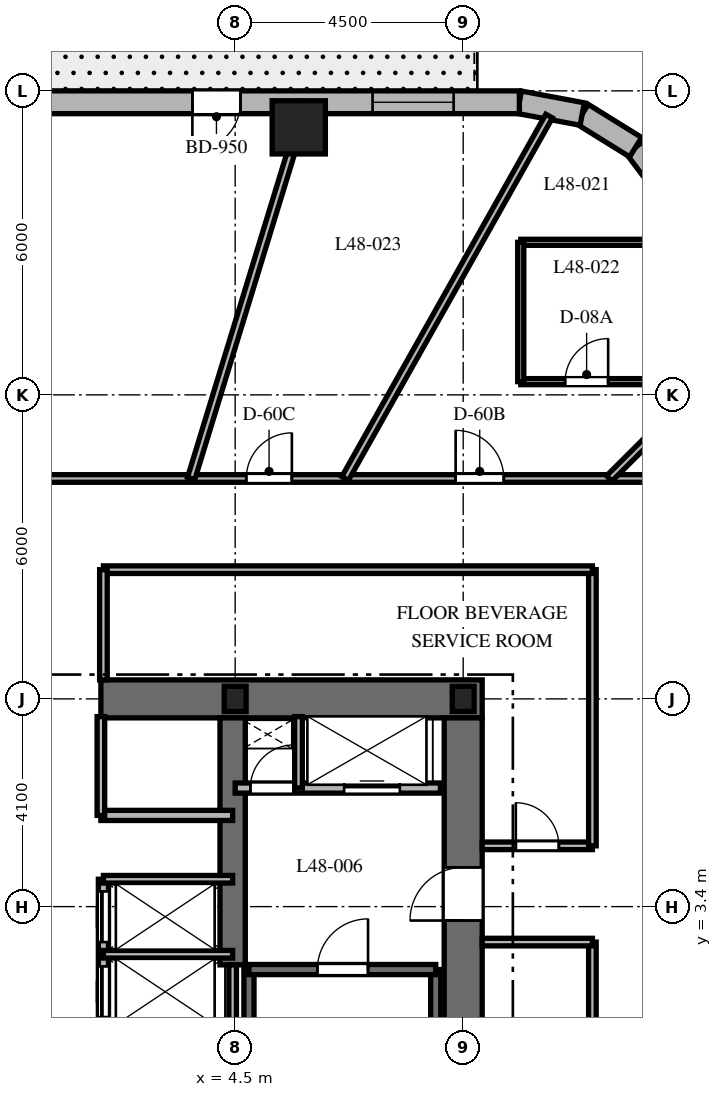
"""IFC4 building model, lengths in metres.
Left out: names, types, materials, properties, quantities, classifications, styles, units other than length and angle.
Written with IfcOpenShell. Run it as: python <this file> out.ifc"""

import sys

from ifc_helpers import new_model, si_unit, direction, frame, frame_2d, origin, origin_2d, place, context, subcontext, project, spatial, rectangle, i_section, extrude, element, fill, save


model = new_model("IFC4")
c1 = context("Model", 3, precision=1e-05, world=origin(), true_north=direction((0.0, 1.0)))
c2 = subcontext(c1, "Body", "Model", "MODEL_VIEW")
j1 = project(units=[si_unit("LENGTHUNIT", "METRE"), si_unit("PLANEANGLEUNIT", "RADIAN")], contexts=[c1])
p1 = place(None, origin())
s1 = spatial("IfcSite", under=j1, at=p1, CompositionType="ELEMENT")
p2 = place(p1, origin())
s2 = spatial("IfcBuilding", under=s1, at=p2, CompositionType="ELEMENT")
p3 = place(p2, frame((0.0, 0.0, 194.1)))
s3 = spatial("IfcBuildingStorey", under=s2, at=p3, CompositionType="ELEMENT", Elevation=194.1)
p4 = place(p3, frame((1.85, 7.5, 0.0), z_axis=(0.0, 0.0, 1.0), x_axis=(1.0, 0.0, 0.0)))
e1 = element("IfcWall", 1, at=p4, inside=s3, PredefinedType="SHEAR", context=c2, shape_type="SweptSolid", body=[
    extrude(rectangle(XDim=7.525, YDim=0.75, at=frame_2d((3.762, 0.0))), origin(), (0.0, 0.0, 1.0), 3.7),
])
p5 = place(p3, frame((9.0, -7.125, 0.0), z_axis=(0.0, 0.0, 1.0), x_axis=(0.0, 1.0, 0.0)))
e2 = element("IfcWall", 2, at=p5, inside=s3, PredefinedType="SHEAR", context=c2, shape_type="SweptSolid", body=[
    extrude(rectangle(XDim=14.25, YDim=0.75, at=frame_2d((7.125, 0.0))), origin(), (0.0, 0.0, 1.0), 3.7),
])
p6 = place(p5, frame((10.25, 0.0, 0.0)))
e3 = element("IfcOpeningElement", 3, at=p6, cuts=e2, PredefinedType="OPENING", context=c2, shape_type="SweptSolid", body=[
    extrude(rectangle(XDim=1.05, YDim=2.15, at=frame_2d((0.525, 1.075))), frame((0.0, 0.385, 0.0), z_axis=(0.0, -1.0, 0.0), x_axis=(1.0, 0.0, 0.0)), (0.0, 0.0, 1.0), 0.77),
])
p7 = place(p3, frame((4.45, 2.25, 0.0), z_axis=(0.0, 0.0, 1.0), x_axis=(0.0, 1.0, 0.0)))
e4 = element("IfcWall", 4, at=p7, inside=s3, PredefinedType="SHEAR", context=c2, shape_type="SweptSolid", body=[
    extrude(rectangle(XDim=4.875, YDim=0.5, at=frame_2d((2.438, 0.0))), origin(), (0.0, 0.0, 1.0), 3.7),
])
for number, where, z_axis, x_axis in (
    (5, (4.772, -6.985, 0.0), (0.0, 0.0, 1.0), (0.0, 1.0, 0.0)),
    (6, (8.458, -6.985, 0.0), (0.0, 0.0, 1.0), (0.0, 1.0, 0.0)),
):
    element("IfcWall", number, at=place(p3, frame(where, z_axis=z_axis, x_axis=x_axis)), inside=s3, PredefinedType="SHEAR", context=c2, shape_type="SweptSolid", body=[
        extrude(rectangle(XDim=9.143, YDim=0.2, at=frame_2d((4.572, 0.0))), origin(), (0.0, 0.0, 1.0), 3.7),
    ])
p8 = place(p3, frame((4.772, 2.158, 0.0), z_axis=(0.0, 0.0, 1.0), x_axis=(1.0, 0.0, 0.0)))
e7 = element("IfcWall", 7, at=p8, inside=s3, PredefinedType="SHEAR", context=c2, shape_type="SweptSolid", body=[
    extrude(rectangle(XDim=3.686, YDim=0.2, at=frame_2d((1.843, 0.0))), origin(), (0.0, 0.0, 1.0), 3.7),
])
p9 = place(p8, frame((1.35, 0.0, 0.0)))
e8 = element("IfcOpeningElement", 8, at=p9, cuts=e7, PredefinedType="OPENING", context=c2, shape_type="SweptSolid", body=[
    extrude(rectangle(XDim=1.0, YDim=2.15, at=frame_2d((0.5, 1.075))), frame((0.0, 0.11, 0.0), z_axis=(0.0, -1.0, 0.0), x_axis=(1.0, 0.0, 0.0)), (0.0, 0.0, 1.0), 0.22),
])
for number, where, z_axis, x_axis in (
    (9, (9.0, 7.5, 0.0), (0.0, 0.0, 1.0), (1.0, 0.0, 0.0)),
    (10, (4.5, 7.5, 0.0), (0.0, 0.0, 1.0), (1.0, 0.0, 0.0)),
):
    element("IfcColumn", number, at=place(p3, frame(where, z_axis=z_axis, x_axis=x_axis)), inside=s3, PredefinedType="COLUMN", context=c2, shape_type="SweptSolid", body=[
        extrude(i_section(OverallWidth=0.432, OverallDepth=0.498, WebThickness=0.056, FlangeThickness=0.089, at=origin_2d()), origin(), (0.0, 0.0, 1.0), 3.7),
    ])
p10 = place(p3, frame((5.755, 18.78, 0.0), z_axis=(0.0, 0.0, 1.0), x_axis=(1.0, 0.0, 0.0)))
e11 = element("IfcColumn", 11, at=p10, inside=s3, PredefinedType="COLUMN", context=c2, shape_type="SweptSolid", body=[
    extrude(rectangle(XDim=1.05, YDim=1.05, at=origin_2d()), origin(), (0.0, 0.0, 1.0), 3.7),
])
p11 = place(p3, frame((13.162, 17.381, 0.0), z_axis=(0.0, 0.0, 1.0), x_axis=(-0.601515770517, 0.798860925205, 0.0)))
e12 = element("IfcWall", 12, at=p11, inside=s3, PredefinedType="SOLIDWALL", context=c2, shape_type="SweptSolid", body=[
    extrude(rectangle(XDim=1.262, YDim=0.45, at=frame_2d((0.631, 0.0))), origin(), (0.0, 0.0, 1.0), 3.4),
])
p12 = place(p3, frame((12.403, 18.389, 0.0), z_axis=(0.0, 0.0, 1.0), x_axis=(-0.849795170926, 0.527113049991, 0.0)))
e13 = element("IfcWall", 13, at=p12, inside=s3, PredefinedType="SOLIDWALL", context=c2, shape_type="SweptSolid", body=[
    extrude(rectangle(XDim=1.241, YDim=0.45, at=frame_2d((0.62, 0.0))), origin(), (0.0, 0.0, 1.0), 3.4),
])
p13 = place(p3, frame((11.349, 19.043, 0.0), z_axis=(0.0, 0.0, 1.0), x_axis=(-0.982931267051, 0.183973161772, 0.0)))
e14 = element("IfcWall", 14, at=p13, inside=s3, PredefinedType="SOLIDWALL", context=c2, shape_type="SweptSolid", body=[
    extrude(rectangle(XDim=1.262, YDim=0.45, at=frame_2d((0.631, 0.0))), origin(), (0.0, 0.0, 1.0), 3.4),
])
p14 = place(p3, frame((10.108, 19.275, 0.0), z_axis=(0.0, 0.0, 1.0), x_axis=(-1.0, 0.0, 0.0)))
e15 = element("IfcWall", 15, at=p14, inside=s3, PredefinedType="SOLIDWALL", context=c2, shape_type="SweptSolid", body=[
    extrude(rectangle(XDim=21.829, YDim=0.45, at=frame_2d((10.915, 0.0))), origin(), (0.0, 0.0, 1.0), 3.4),
])
p15 = place(p14, frame((5.503, 0.0, 0.0)))
e16 = element("IfcOpeningElement", 16, at=p15, cuts=e15, PredefinedType="OPENING", context=c2, shape_type="SweptSolid", body=[
    extrude(rectangle(XDim=0.95, YDim=2.15, at=frame_2d((0.475, 1.075))), frame((0.0, 0.235, 0.0), z_axis=(0.0, -1.0, 0.0), x_axis=(1.0, 0.0, 0.0)), (0.0, 0.0, 1.0), 0.47),
])
p16 = place(p14, frame((1.297, 0.0, 0.8)))
e17 = element("IfcOpeningElement", 17, at=p16, cuts=e15, PredefinedType="OPENING", context=c2, shape_type="SweptSolid", body=[
    extrude(rectangle(XDim=1.6, YDim=1.75, at=frame_2d((0.8, 0.875))), frame((0.0, 0.235, 0.0), z_axis=(0.0, -1.0, 0.0), x_axis=(1.0, 0.0, 0.0)), (0.0, 0.0, 1.0), 0.47),
])
p17 = place(p14, frame((10.115, 0.0, 0.8)))
e18 = element("IfcOpeningElement", 18, at=p17, cuts=e15, PredefinedType="OPENING", context=c2, shape_type="SweptSolid", body=[
    extrude(rectangle(XDim=1.6, YDim=1.75, at=frame_2d((0.8, 0.875))), frame((0.0, 0.235, 0.0), z_axis=(0.0, -1.0, 0.0), x_axis=(1.0, 0.0, 0.0)), (0.0, 0.0, 1.0), 0.47),
])
p18 = place(p14, frame((18.933, 0.0, 0.8)))
e19 = element("IfcOpeningElement", 19, at=p18, cuts=e15, PredefinedType="OPENING", context=c2, shape_type="SweptSolid", body=[
    extrude(rectangle(XDim=1.6, YDim=1.75, at=frame_2d((0.8, 0.875))), frame((0.0, 0.235, 0.0), z_axis=(0.0, -1.0, 0.0), x_axis=(1.0, 0.0, 0.0)), (0.0, 0.0, 1.0), 0.47),
])
p19 = place(p3, frame((4.5, 5.74, 0.0), z_axis=(0.0, 0.0, 1.0), x_axis=(1.0, 0.0, 0.0)))
e20 = element("IfcWall", 20, at=p19, inside=s3, PredefinedType="PARTITIONING", context=c2, shape_type="SweptSolid", body=[
    extrude(rectangle(XDim=4.05, YDim=0.2, at=frame_2d((2.025, 0.0))), origin(), (0.0, 0.0, 1.0), 3.4),
])
p20 = place(p19, frame((0.3, 0.0, 0.0)))
e21 = element("IfcOpeningElement", 21, at=p20, cuts=e20, PredefinedType="OPENING", context=c2, shape_type="SweptSolid", body=[
    extrude(rectangle(XDim=0.85, YDim=2.03, at=frame_2d((0.425, 1.015))), frame((0.0, 0.11, 0.0), z_axis=(0.0, -1.0, 0.0), x_axis=(1.0, 0.0, 0.0)), (0.0, 0.0, 1.0), 0.22),
])
p21 = place(p19, frame((2.15, 0.0, 0.0)))
e22 = element("IfcOpeningElement", 22, at=p21, cuts=e20, PredefinedType="OPENING", context=c2, shape_type="SweptSolid", body=[
    extrude(rectangle(XDim=1.1, YDim=2.2, at=frame_2d((0.55, 1.1))), frame((0.0, 0.11, 0.0), z_axis=(0.0, -1.0, 0.0), x_axis=(1.0, 0.0, 0.0)), (0.0, 0.0, 1.0), 0.22),
])
p22 = place(p3, frame((5.75, 5.74, 0.0), z_axis=(0.0, 0.0, 1.0), x_axis=(0.0, 1.0, 0.0)))
e23 = element("IfcWall", 23, at=p22, inside=s3, PredefinedType="PARTITIONING", context=c2, shape_type="SweptSolid", body=[
    extrude(rectangle(XDim=1.41, YDim=0.15, at=frame_2d((0.705, 0.0))), origin(), (0.0, 0.0, 1.0), 3.4),
])
p23 = place(p3, frame((1.85, 5.2, 0.0), z_axis=(0.0, 0.0, 1.0), x_axis=(1.0, 0.0, 0.0)))
e24 = element("IfcWall", 24, at=p23, inside=s3, PredefinedType="PARTITIONING", context=c2, shape_type="SweptSolid", body=[
    extrude(rectangle(XDim=2.6, YDim=0.2, at=frame_2d((1.3, 0.0))), origin(), (0.0, 0.0, 1.0), 3.4),
])
p24 = place(p3, frame((1.85, 5.2, 0.0), z_axis=(0.0, 0.0, 1.0), x_axis=(0.0, 1.0, 0.0)))
e25 = element("IfcWall", 25, at=p24, inside=s3, PredefinedType="PARTITIONING", context=c2, shape_type="SweptSolid", body=[
    extrude(rectangle(XDim=1.95, YDim=0.15, at=frame_2d((0.975, 0.0))), origin(), (0.0, 0.0, 1.0), 3.4),
])
p25 = place(p3, frame((4.45, -1.972, 0.0), z_axis=(0.0, 0.0, 1.0), x_axis=(0.0, 1.0, 0.0)))
e26 = element("IfcWall", 26, at=p25, inside=s3, PredefinedType="PARTITIONING", context=c2, shape_type="SweptSolid", body=[
    extrude(rectangle(XDim=4.222, YDim=0.15, at=frame_2d((2.111, 0.0))), origin(), (0.0, 0.0, 1.0), 3.4),
])
p26 = place(p3, frame((1.9, -0.5, 0.0), z_axis=(0.0, 0.0, 1.0), x_axis=(0.0, 1.0, 0.0)))
e27 = element("IfcWall", 27, at=p26, inside=s3, PredefinedType="PARTITIONING", context=c2, shape_type="SweptSolid", body=[
    extrude(rectangle(XDim=4.44, YDim=0.2, at=frame_2d((2.22, 0.0))), origin(), (0.0, 0.0, 1.0), 3.4),
])
p27 = place(p26, frame((0.24, 0.0, 0.0)))
e28 = element("IfcOpeningElement", 28, at=p27, cuts=e27, PredefinedType="OPENING", context=c2, shape_type="SweptSolid", body=[
    extrude(rectangle(XDim=1.0, YDim=2.2, at=frame_2d((0.5, 1.1))), frame((0.0, 0.11, 0.0), z_axis=(0.0, -1.0, 0.0), x_axis=(1.0, 0.0, 0.0)), (0.0, 0.0, 1.0), 0.22),
])
p28 = place(p26, frame((1.72, 0.0, 0.0)))
e29 = element("IfcOpeningElement", 29, at=p28, cuts=e27, PredefinedType="OPENING", context=c2, shape_type="SweptSolid", body=[
    extrude(rectangle(XDim=1.0, YDim=2.2, at=frame_2d((0.5, 1.1))), frame((0.0, 0.11, 0.0), z_axis=(0.0, -1.0, 0.0), x_axis=(1.0, 0.0, 0.0)), (0.0, 0.0, 1.0), 0.22),
])
p29 = place(p26, frame((3.2, 0.0, 0.0)))
e30 = element("IfcOpeningElement", 30, at=p29, cuts=e27, PredefinedType="OPENING", context=c2, shape_type="SweptSolid", body=[
    extrude(rectangle(XDim=1.0, YDim=2.2, at=frame_2d((0.5, 1.1))), frame((0.0, 0.11, 0.0), z_axis=(0.0, -1.0, 0.0), x_axis=(1.0, 0.0, 0.0)), (0.0, 0.0, 1.0), 0.22),
])
for number, where, z_axis, x_axis in (
    (31, (1.9, 3.94, 0.0), (0.0, 0.0, 1.0), (1.0, 0.0, 0.0)),
    (32, (1.9, 2.46, 0.0), (0.0, 0.0, 1.0), (1.0, 0.0, 0.0)),
):
    element("IfcWall", number, at=place(p3, frame(where, z_axis=z_axis, x_axis=x_axis)), inside=s3, PredefinedType="PARTITIONING", context=c2, shape_type="SweptSolid", body=[
        extrude(rectangle(XDim=2.55, YDim=0.15, at=frame_2d((1.275, 0.0))), origin(), (0.0, 0.0, 1.0), 3.4),
    ])
p30 = place(p3, frame((-13.35, 11.85, 0.0), z_axis=(0.0, 0.0, 1.0), x_axis=(1.0, 0.0, 0.0)))
e33 = element("IfcWall", 33, at=p30, inside=s3, PredefinedType="PARTITIONING", context=c2, shape_type="SweptSolid", body=[
    extrude(rectangle(XDim=26.7, YDim=0.15, at=frame_2d((13.35, 0.0))), origin(), (0.0, 0.0, 1.0), 2.84),
])
p31 = place(p30, frame((22.201, 0.0, 0.0)))
e34 = element("IfcOpeningElement", 34, at=p31, cuts=e33, PredefinedType="OPENING", context=c2, shape_type="SweptSolid", body=[
    extrude(rectangle(XDim=0.95, YDim=2.03, at=frame_2d((0.475, 1.015))), frame((0.0, 0.085, 0.0), z_axis=(0.0, -1.0, 0.0), x_axis=(1.0, 0.0, 0.0)), (0.0, 0.0, 1.0), 0.17),
])
p32 = place(p30, frame((18.069, 0.0, 0.0)))
e35 = element("IfcOpeningElement", 35, at=p32, cuts=e33, PredefinedType="OPENING", context=c2, shape_type="SweptSolid", body=[
    extrude(rectangle(XDim=0.9, YDim=2.03, at=frame_2d((0.45, 1.015))), frame((0.0, 0.085, 0.0), z_axis=(0.0, -1.0, 0.0), x_axis=(1.0, 0.0, 0.0)), (0.0, 0.0, 1.0), 0.17),
])
p33 = place(p30, frame((12.362, 0.0, 0.0)))
e36 = element("IfcOpeningElement", 36, at=p33, cuts=e33, PredefinedType="OPENING", context=c2, shape_type="SweptSolid", body=[
    extrude(rectangle(XDim=0.95, YDim=2.03, at=frame_2d((0.475, 1.015))), frame((0.0, 0.085, 0.0), z_axis=(0.0, -1.0, 0.0), x_axis=(1.0, 0.0, 0.0)), (0.0, 0.0, 1.0), 0.17),
])
p34 = place(p30, frame((3.995, 0.0, 0.0)))
e37 = element("IfcOpeningElement", 37, at=p34, cuts=e33, PredefinedType="OPENING", context=c2, shape_type="SweptSolid", body=[
    extrude(rectangle(XDim=0.95, YDim=2.03, at=frame_2d((0.475, 1.015))), frame((0.0, 0.085, 0.0), z_axis=(0.0, -1.0, 0.0), x_axis=(1.0, 0.0, 0.0)), (0.0, 0.0, 1.0), 0.17),
])
p35 = place(p3, frame((11.55, -10.05, 0.0), z_axis=(0.0, 0.0, 1.0), x_axis=(0.0, 1.0, 0.0)))
e38 = element("IfcWall", 38, at=p35, inside=s3, PredefinedType="PARTITIONING", context=c2, shape_type="SweptSolid", body=[
    extrude(rectangle(XDim=12.75, YDim=0.15, at=frame_2d((6.375, 0.0))), origin(), (0.0, 0.0, 1.0), 2.84),
])
p36 = place(p35, frame((5.95, 0.0, 0.0)))
e39 = element("IfcOpeningElement", 39, at=p36, cuts=e38, PredefinedType="OPENING", context=c2, shape_type="SweptSolid", body=[
    extrude(rectangle(XDim=0.85, YDim=2.03, at=frame_2d((0.425, 1.015))), frame((0.0, 0.085, 0.0), z_axis=(0.0, -1.0, 0.0), x_axis=(1.0, 0.0, 0.0)), (0.0, 0.0, 1.0), 0.17),
])
p37 = place(p3, frame((11.55, 2.7, 0.0), z_axis=(0.0, 0.0, 1.0), x_axis=(-1.0, 0.0, 0.0)))
e40 = element("IfcWall", 40, at=p37, inside=s3, PredefinedType="PARTITIONING", context=c2, shape_type="SweptSolid", body=[
    extrude(rectangle(XDim=2.175, YDim=0.15, at=frame_2d((1.087, 0.0))), origin(), (0.0, 0.0, 1.0), 3.4),
])
p38 = place(p3, frame((9.375, 4.6, 0.0), z_axis=(0.0, 0.0, 1.0), x_axis=(1.0, 0.0, 0.0)))
e41 = element("IfcWall", 41, at=p38, inside=s3, PredefinedType="PARTITIONING", context=c2, shape_type="SweptSolid", body=[
    extrude(rectangle(XDim=2.175, YDim=0.15, at=frame_2d((1.087, 0.0))), origin(), (0.0, 0.0, 1.0), 3.4),
])
p39 = place(p38, frame((0.663, 0.0, 0.0)))
e42 = element("IfcOpeningElement", 42, at=p39, cuts=e41, PredefinedType="OPENING", context=c2, shape_type="SweptSolid", body=[
    extrude(rectangle(XDim=0.85, YDim=2.03, at=frame_2d((0.425, 1.015))), frame((0.0, 0.085, 0.0), z_axis=(0.0, -1.0, 0.0), x_axis=(1.0, 0.0, 0.0)), (0.0, 0.0, 1.0), 0.17),
])
p40 = place(p3, frame((11.55, 4.6, 0.0), z_axis=(0.0, 0.0, 1.0), x_axis=(0.0, 1.0, 0.0)))
e43 = element("IfcWall", 43, at=p40, inside=s3, PredefinedType="PARTITIONING", context=c2, shape_type="SweptSolid", body=[
    extrude(rectangle(XDim=5.45, YDim=0.15, at=frame_2d((2.725, 0.0))), origin(), (0.0, 0.0, 1.0), 2.84),
])
p41 = place(p3, frame((11.55, 10.05, 0.0), z_axis=(0.0, 0.0, 1.0), x_axis=(-1.0, 0.0, 0.0)))
e44 = element("IfcWall", 44, at=p41, inside=s3, PredefinedType="PARTITIONING", context=c2, shape_type="SweptSolid", body=[
    extrude(rectangle(XDim=9.65, YDim=0.15, at=frame_2d((4.825, 0.0))), origin(), (0.0, 0.0, 1.0), 2.84),
])
p42 = place(p3, frame((1.9, 10.05, 0.0), z_axis=(0.0, 0.0, 1.0), x_axis=(0.0, -1.0, 0.0)))
e45 = element("IfcWall", 45, at=p42, inside=s3, PredefinedType="PARTITIONING", context=c2, shape_type="SweptSolid", body=[
    extrude(rectangle(XDim=2.175, YDim=0.15, at=frame_2d((1.087, 0.0))), origin(), (0.0, 0.0, 1.0), 3.4),
])
p43 = place(p3, frame((11.882, 11.85, 0.0), z_axis=(0.0, 0.0, 1.0), x_axis=(0.708037373639, 0.706174962407, 0.0)))
e46 = element("IfcWall", 46, at=p43, inside=s3, PredefinedType="PARTITIONING", context=c2, shape_type="SweptSolid", body=[
    extrude(rectangle(XDim=3.802, YDim=0.15, at=frame_2d((1.901, 0.0))), origin(), (0.0, 0.0, 1.0), 2.64),
])
p44 = place(p3, frame((6.67, 11.85, 0.0), z_axis=(0.0, 0.0, 1.0), x_axis=(0.490522493943, 0.871428530022, 0.0)))
e47 = element("IfcWall", 47, at=p44, inside=s3, PredefinedType="PARTITIONING", context=c2, shape_type="SweptSolid", body=[
    extrude(rectangle(XDim=8.207, YDim=0.15, at=frame_2d((4.104, 0.0))), origin(), (0.0, 0.0, 1.0), 2.64),
])
p45 = place(p3, frame((3.631, 11.85, 0.0), z_axis=(0.0, 0.0, 1.0), x_axis=(0.293007573338, 0.956110120209, 0.0)))
e48 = element("IfcWall", 48, at=p45, inside=s3, PredefinedType="PARTITIONING", context=c2, shape_type="SweptSolid", body=[
    extrude(rectangle(XDim=7.766, YDim=0.15, at=frame_2d((3.883, 0.0))), origin(), (0.0, 0.0, 1.0), 2.64),
])
p46 = place(p3, frame((10.136, 13.761, 0.0), z_axis=(0.0, 0.0, 1.0), x_axis=(1.0, 0.0, 0.0)))
e49 = element("IfcWall", 49, at=p46, inside=s3, PredefinedType="PARTITIONING", context=c2, shape_type="SweptSolid", body=[
    extrude(rectangle(XDim=2.6, YDim=0.12, at=frame_2d((1.3, 0.0))), origin(), (0.0, 0.0, 1.0), 3.4),
])
p47 = place(p46, frame((0.875, 0.0, 0.0)))
e50 = element("IfcOpeningElement", 50, at=p47, cuts=e49, PredefinedType="OPENING", context=c2, shape_type="SweptSolid", body=[
    extrude(rectangle(XDim=0.85, YDim=2.03, at=frame_2d((0.425, 1.015))), frame((0.0, 0.07, 0.0), z_axis=(0.0, -1.0, 0.0), x_axis=(1.0, 0.0, 0.0)), (0.0, 0.0, 1.0), 0.14),
])
p48 = place(p3, frame((12.736, 16.511, 0.0), z_axis=(0.0, 0.0, 1.0), x_axis=(-1.0, 0.0, 0.0)))
e51 = element("IfcWall", 51, at=p48, inside=s3, PredefinedType="PARTITIONING", context=c2, shape_type="SweptSolid", body=[
    extrude(rectangle(XDim=2.6, YDim=0.12, at=frame_2d((1.3, 0.0))), origin(), (0.0, 0.0, 1.0), 2.64),
])
p49 = place(p3, frame((10.136, 16.511, 0.0), z_axis=(0.0, 0.0, 1.0), x_axis=(0.0, -1.0, 0.0)))
e52 = element("IfcWall", 52, at=p49, inside=s3, PredefinedType="PARTITIONING", context=c2, shape_type="SweptSolid", body=[
    extrude(rectangle(XDim=2.75, YDim=0.12, at=frame_2d((1.375, 0.0))), origin(), (0.0, 0.0, 1.0), 2.64),
])
p50 = place(p15, origin())
e53 = element("IfcDoor", 53, at=p50, inside=s3, OperationType="SINGLE_SWING_RIGHT", PredefinedType="DOOR", context=c2, shape_type="SweptSolid", body=[
    extrude(rectangle(XDim=0.95, YDim=2.15, at=frame_2d((0.475, 1.075))), frame((0.0, 0.025, 0.0), z_axis=(0.0, -1.0, 0.0), x_axis=(1.0, 0.0, 0.0)), (0.0, 0.0, 1.0), 0.05),
])
fill(e16, e53)
p51 = place(p16, origin())
e54 = element("IfcWindow", 54, at=p51, inside=s3, PartitioningType="SINGLE_PANEL", PredefinedType="WINDOW", context=c2, shape_type="SweptSolid", body=[
    extrude(rectangle(XDim=1.6, YDim=1.75, at=frame_2d((0.8, 0.875))), frame((0.0, 0.03, 0.0), z_axis=(0.0, -1.0, 0.0), x_axis=(1.0, 0.0, 0.0)), (0.0, 0.0, 1.0), 0.06),
])
fill(e17, e54)
p52 = place(p9, origin())
e55 = element("IfcDoor", 55, at=p52, inside=s3, OperationType="SINGLE_SWING_RIGHT", PredefinedType="DOOR", context=c2, shape_type="SweptSolid", body=[
    extrude(rectangle(XDim=1.0, YDim=2.15, at=frame_2d((0.5, 1.075))), frame((0.0, 0.025, 0.0), z_axis=(0.0, -1.0, 0.0), x_axis=(1.0, 0.0, 0.0)), (0.0, 0.0, 1.0), 0.05),
])
fill(e8, e55)
p53 = place(p6, origin())
e56 = element("IfcDoor", 56, at=p53, inside=s3, OperationType="SINGLE_SWING_LEFT", PredefinedType="DOOR", context=c2, shape_type="SweptSolid", body=[
    extrude(rectangle(XDim=1.05, YDim=2.15, at=frame_2d((0.525, 1.075))), frame((0.0, 0.025, 0.0), z_axis=(0.0, -1.0, 0.0), x_axis=(1.0, 0.0, 0.0)), (0.0, 0.0, 1.0), 0.05),
])
fill(e3, e56)
p54 = place(p20, origin())
e57 = element("IfcDoor", 57, at=p54, inside=s3, OperationType="SINGLE_SWING_RIGHT", PredefinedType="DOOR", context=c2, shape_type="SweptSolid", body=[
    extrude(rectangle(XDim=0.85, YDim=2.03, at=frame_2d((0.425, 1.015))), frame((0.0, 0.025, 0.0), z_axis=(0.0, -1.0, 0.0), x_axis=(1.0, 0.0, 0.0)), (0.0, 0.0, 1.0), 0.05),
])
fill(e21, e57)
p55 = place(p21, origin())
e58 = element("IfcDoor", 58, at=p55, inside=s3, OperationType="SLIDING_TO_RIGHT", PredefinedType="DOOR", context=c2, shape_type="SweptSolid", body=[
    extrude(rectangle(XDim=1.1, YDim=2.2, at=frame_2d((0.55, 1.1))), frame((0.0, 0.025, 0.0), z_axis=(0.0, -1.0, 0.0), x_axis=(1.0, 0.0, 0.0)), (0.0, 0.0, 1.0), 0.05),
])
fill(e22, e58)
p56 = place(p28, origin())
e59 = element("IfcDoor", 59, at=p56, inside=s3, OperationType="SLIDING_TO_RIGHT", PredefinedType="DOOR", context=c2, shape_type="SweptSolid", body=[
    extrude(rectangle(XDim=1.0, YDim=2.2, at=frame_2d((0.5, 1.1))), frame((0.0, 0.025, 0.0), z_axis=(0.0, -1.0, 0.0), x_axis=(1.0, 0.0, 0.0)), (0.0, 0.0, 1.0), 0.05),
])
fill(e29, e59)
p57 = place(p29, origin())
e60 = element("IfcDoor", 60, at=p57, inside=s3, OperationType="SLIDING_TO_RIGHT", PredefinedType="DOOR", context=c2, shape_type="SweptSolid", body=[
    extrude(rectangle(XDim=1.0, YDim=2.2, at=frame_2d((0.5, 1.1))), frame((0.0, 0.025, 0.0), z_axis=(0.0, -1.0, 0.0), x_axis=(1.0, 0.0, 0.0)), (0.0, 0.0, 1.0), 0.05),
])
fill(e30, e60)
p58 = place(p39, origin())
e61 = element("IfcDoor", 61, at=p58, inside=s3, OperationType="SINGLE_SWING_LEFT", PredefinedType="DOOR", context=c2, shape_type="SweptSolid", body=[
    extrude(rectangle(XDim=0.85, YDim=2.03, at=frame_2d((0.425, 1.015))), frame((0.0, 0.025, 0.0), z_axis=(0.0, -1.0, 0.0), x_axis=(1.0, 0.0, 0.0)), (0.0, 0.0, 1.0), 0.05),
])
fill(e42, e61)
p59 = place(p31, origin())
e62 = element("IfcDoor", 62, at=p59, inside=s3, OperationType="SINGLE_SWING_LEFT", PredefinedType="DOOR", context=c2, shape_type="SweptSolid", body=[
    extrude(rectangle(XDim=0.95, YDim=2.03, at=frame_2d((0.475, 1.015))), frame((0.0, 0.025, 0.0), z_axis=(0.0, -1.0, 0.0), x_axis=(1.0, 0.0, 0.0)), (0.0, 0.0, 1.0), 0.05),
])
fill(e34, e62)
p60 = place(p47, origin())
e63 = element("IfcDoor", 63, at=p60, inside=s3, OperationType="SINGLE_SWING_RIGHT", PredefinedType="DOOR", context=c2, shape_type="SweptSolid", body=[
    extrude(rectangle(XDim=0.85, YDim=2.03, at=frame_2d((0.425, 1.015))), frame((0.0, 0.025, 0.0), z_axis=(0.0, -1.0, 0.0), x_axis=(1.0, 0.0, 0.0)), (0.0, 0.0, 1.0), 0.05),
])
fill(e50, e63)
p61 = place(p32, origin())
e64 = element("IfcDoor", 64, at=p61, inside=s3, OperationType="SINGLE_SWING_RIGHT", PredefinedType="DOOR", context=c2, shape_type="SweptSolid", body=[
    extrude(rectangle(XDim=0.9, YDim=2.03, at=frame_2d((0.45, 1.015))), frame((0.0, 0.025, 0.0), z_axis=(0.0, -1.0, 0.0), x_axis=(1.0, 0.0, 0.0)), (0.0, 0.0, 1.0), 0.05),
])
fill(e35, e64)
save(model, sys.argv[1])
